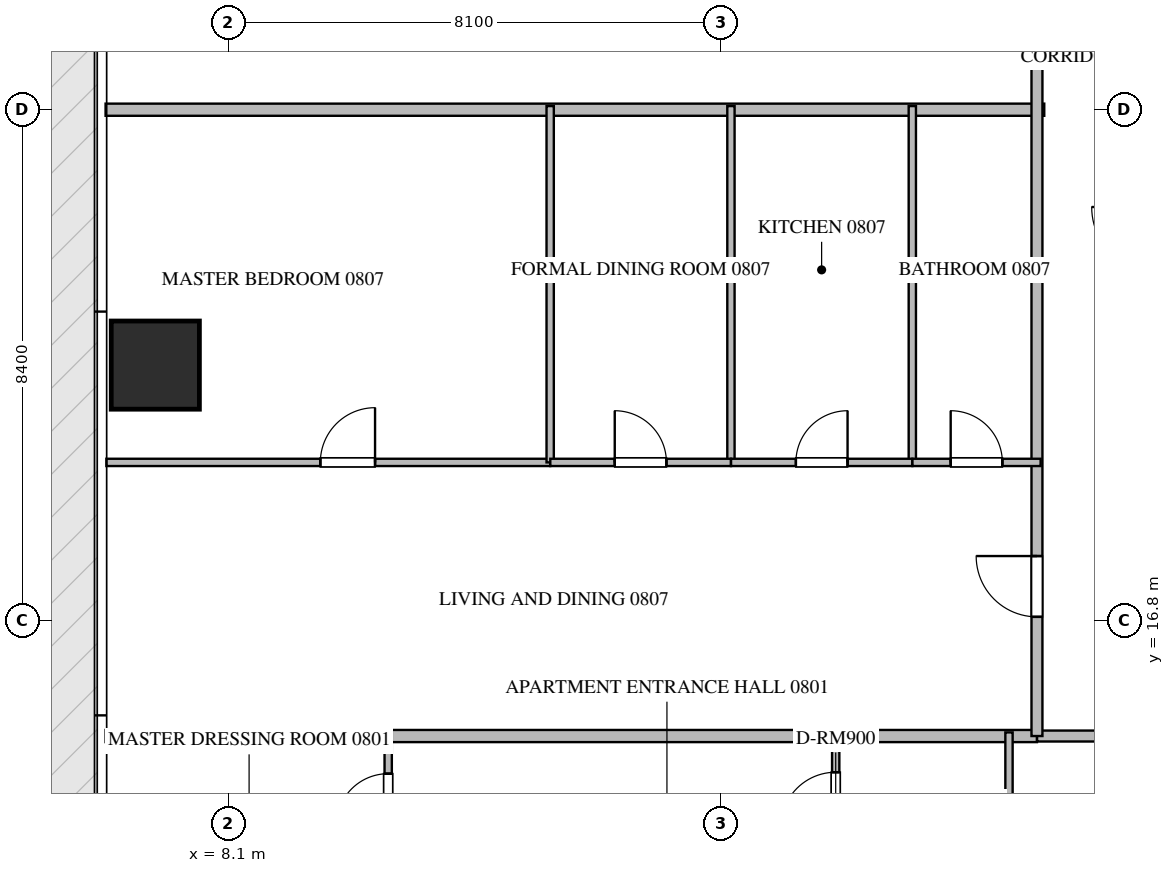
"""IFC4 building model, lengths in metres.
Left out: names, types, materials, properties, quantities, classifications, styles, units other than length and angle.
Written with IfcOpenShell. Run it as: python <this file> out.ifc"""

import sys

from ifc_helpers import new_model, si_unit, direction, frame, frame_2d, origin, origin_2d, place, context, subcontext, project, spatial, rectangle, extrude, source, transform, mapped, element, fill, save


model = new_model("IFC4")
c1 = context("Model", 3, precision=1e-05, world=origin(), true_north=direction((0.0, 1.0)))
c2 = subcontext(c1, "Body", "Model", "MODEL_VIEW")
j1 = project(units=[si_unit("LENGTHUNIT", "METRE"), si_unit("PLANEANGLEUNIT", "RADIAN")], contexts=[c1])
p1 = place(None, origin())
s1 = spatial("IfcSite", under=j1, at=p1, CompositionType="ELEMENT")
p2 = place(p1, origin())
s2 = spatial("IfcBuilding", under=s1, at=p2, CompositionType="ELEMENT")
p3 = place(p2, frame((0.0, 0.0, 37.95)))
s3 = spatial("IfcBuildingStorey", under=s2, at=p3, CompositionType="ELEMENT", Elevation=37.95)
m1 = source(origin(), c2, "Body", "SweptSolid", [
    extrude(rectangle(XDim=1.45, YDim=1.45, at=origin_2d()), origin(), (0.0, 0.0, 1.0), 3.75),
])
p4 = place(p3, frame((6.9, 21.0, -0.26), z_axis=(0.0, 0.0, 1.0), x_axis=(1.0, 0.0, 0.0)))
e1 = element("IfcColumn", 1, at=p4, inside=s3, PredefinedType="COLUMN", context=c2, shape_type="MappedRepresentation", body=[
    mapped(m1, transform((0.0, 0.0, 0.0), scale=1.0)),
])
p5 = place(p3, frame((6.082, 25.2, 0.0), z_axis=(0.0, 0.0, 1.0), x_axis=(1.0, 0.0, 0.0)))
e2 = element("IfcWall", 2, at=p5, inside=s3, PredefinedType="PARTITIONING", context=c2, shape_type="SweptSolid", body=[
    extrude(rectangle(XDim=15.438, YDim=0.2, at=frame_2d((7.719, 0.0))), origin(), (0.0, 0.0, 1.0), 3.49),
])
p6 = place(p3, frame((6.082, 14.9, 0.0), z_axis=(0.0, 0.0, 1.0), x_axis=(1.0, 0.0, 0.0)))
e3 = element("IfcWall", 3, at=p6, inside=s3, PredefinedType="PARTITIONING", context=c2, shape_type="SweptSolid", body=[
    extrude(rectangle(XDim=15.318, YDim=0.2, at=frame_2d((7.659, 0.0))), origin(), (0.0, 0.0, 1.0), 3.49),
])
p7 = place(p3, frame((21.402, 14.9, 0.0), z_axis=(0.0, 0.0, 1.0), x_axis=(1.0, 0.0, 0.0)))
e4 = element("IfcWall", 4, at=p7, inside=s3, PredefinedType="PARTITIONING", context=c2, shape_type="SweptSolid", body=[
    extrude(rectangle(XDim=21.996, YDim=0.18, at=frame_2d((10.998, 0.0))), origin(), (0.0, 0.0, 1.0), 3.49),
])
p8 = place(p7, frame((2.1, 0.0, 0.0)))
e5 = element("IfcOpeningElement", 5, at=p8, cuts=e4, PredefinedType="OPENING", context=c2, shape_type="SweptSolid", body=[
    extrude(rectangle(XDim=1.0, YDim=2.15, at=frame_2d((0.5, 1.075))), frame((0.0, 0.1, 0.0), z_axis=(0.0, -1.0, 0.0), x_axis=(1.0, 0.0, 0.0)), (0.0, 0.0, 1.0), 0.2),
])
p9 = place(p7, frame((14.109, 0.0, 0.0)))
e6 = element("IfcOpeningElement", 6, at=p9, cuts=e4, PredefinedType="OPENING", context=c2, shape_type="SweptSolid", body=[
    extrude(rectangle(XDim=1.0, YDim=2.15, at=frame_2d((0.5, 1.075))), frame((0.0, 0.1, 0.0), z_axis=(0.0, -1.0, 0.0), x_axis=(1.0, 0.0, 0.0)), (0.0, 0.0, 1.0), 0.2),
])
p10 = place(p7, frame((18.896, 0.0, 0.0)))
e7 = element("IfcOpeningElement", 7, at=p10, cuts=e4, PredefinedType="OPENING", context=c2, shape_type="SweptSolid", body=[
    extrude(rectangle(XDim=1.0, YDim=2.15, at=frame_2d((0.5, 1.075))), frame((0.0, 0.1, 0.0), z_axis=(0.0, -1.0, 0.0), x_axis=(1.0, 0.0, 0.0)), (0.0, 0.0, 1.0), 0.2),
])
p11 = place(p3, frame((21.4, 14.9, 0.0), z_axis=(0.0, 0.0, 1.0), x_axis=(0.0, 1.0, 0.0)))
e8 = element("IfcWall", 8, at=p11, inside=s3, PredefinedType="PARTITIONING", context=c2, shape_type="SweptSolid", body=[
    extrude(rectangle(XDim=20.6, YDim=0.18, at=frame_2d((10.3, 0.0))), origin(), (0.0, 0.0, 1.0), 3.49),
])
p12 = place(p11, frame((1.96, 0.0, 0.0)))
e9 = element("IfcOpeningElement", 9, at=p12, cuts=e8, PredefinedType="OPENING", context=c2, shape_type="SweptSolid", body=[
    extrude(rectangle(XDim=1.0, YDim=2.15, at=frame_2d((0.5, 1.075))), frame((0.0, 0.1, 0.0), z_axis=(0.0, -1.0, 0.0), x_axis=(1.0, 0.0, 0.0)), (0.0, 0.0, 1.0), 0.2),
])
p13 = place(p11, frame((13.583, 0.0, 0.0)))
e10 = element("IfcOpeningElement", 10, at=p13, cuts=e8, PredefinedType="OPENING", context=c2, shape_type="SweptSolid", body=[
    extrude(rectangle(XDim=1.0, YDim=2.15, at=frame_2d((0.5, 1.075))), frame((0.0, 0.1, 0.0), z_axis=(0.0, -1.0, 0.0), x_axis=(1.0, 0.0, 0.0)), (0.0, 0.0, 1.0), 0.2),
])
p14 = place(p3, frame((20.94, 12.15, 0.0), z_axis=(0.0, 0.0, 1.0), x_axis=(0.0, 1.0, 0.0)))
e11 = element("IfcWall", 11, at=p14, inside=s3, PredefinedType="PARTITIONING", context=c2, shape_type="SweptSolid", body=[
    extrude(rectangle(XDim=2.81, YDim=0.12, at=frame_2d((1.405, 0.0))), origin(), (0.0, 0.0, 1.0), 3.49),
])
p15 = place(p3, frame((18.09, 12.75, 0.0), z_axis=(0.0, 0.0, 1.0), x_axis=(0.0, 1.0, 0.0)))
e12 = element("IfcWall", 12, at=p15, inside=s3, PredefinedType="PARTITIONING", context=c2, shape_type="SweptSolid", body=[
    extrude(rectangle(XDim=2.21, YDim=0.12, at=frame_2d((1.105, 0.0))), origin(), (0.0, 0.0, 1.0), 3.49),
])
p16 = place(p15, frame((0.655, 0.0, 0.0)))
e13 = element("IfcOpeningElement", 13, at=p16, cuts=e12, PredefinedType="OPENING", context=c2, shape_type="SweptSolid", body=[
    extrude(rectangle(XDim=0.9, YDim=2.1, at=frame_2d((0.45, 1.05))), frame((0.0, 0.07, 0.0), z_axis=(0.0, -1.0, 0.0), x_axis=(1.0, 0.0, 0.0)), (0.0, 0.0, 1.0), 0.14),
])
p17 = place(p3, frame((10.73, 12.752, 0.0), z_axis=(0.0, 0.0, 1.0), x_axis=(0.0, 1.0, 0.0)))
e14 = element("IfcWall", 14, at=p17, inside=s3, PredefinedType="PARTITIONING", context=c2, shape_type="SweptSolid", body=[
    extrude(rectangle(XDim=2.208, YDim=0.12, at=frame_2d((1.104, 0.0))), origin(), (0.0, 0.0, 1.0), 3.49),
])
p18 = place(p17, frame((0.679, 0.0, 0.0)))
e15 = element("IfcOpeningElement", 15, at=p18, cuts=e14, PredefinedType="OPENING", context=c2, shape_type="SweptSolid", body=[
    extrude(rectangle(XDim=0.85, YDim=2.1, at=frame_2d((0.425, 1.05))), frame((0.0, 0.07, 0.0), z_axis=(0.0, -1.0, 0.0), x_axis=(1.0, 0.0, 0.0)), (0.0, 0.0, 1.0), 0.14),
])
p19 = place(p3, frame((6.095, 19.4, 0.0), z_axis=(0.0, 0.0, 1.0), x_axis=(1.0, 0.0, 0.0)))
e16 = element("IfcWall", 16, at=p19, inside=s3, PredefinedType="PARTITIONING", context=c2, shape_type="SweptSolid", body=[
    extrude(rectangle(XDim=7.299, YDim=0.12, at=frame_2d((3.649, 0.0))), origin(), (0.0, 0.0, 1.0), 3.49),
])
p20 = place(p19, frame((3.519, 0.0, 0.0)))
e17 = element("IfcOpeningElement", 17, at=p20, cuts=e16, PredefinedType="OPENING", context=c2, shape_type="SweptSolid", body=[
    extrude(rectangle(XDim=0.9, YDim=2.1, at=frame_2d((0.45, 1.05))), frame((0.0, 0.07, 0.0), z_axis=(0.0, -1.0, 0.0), x_axis=(1.0, 0.0, 0.0)), (0.0, 0.0, 1.0), 0.14),
])
for number, where, z_axis, x_axis in (
    (18, (13.394, 19.4, 0.0), (0.0, 0.0, 1.0), (0.0, 1.0, 0.0)),
    (19, (16.367, 19.4, 0.0), (0.0, 0.0, 1.0), (0.0, 1.0, 0.0)),
    (20, (19.35, 19.4, 0.0), (0.0, 0.0, 1.0), (0.0, 1.0, 0.0)),
):
    element("IfcWall", number, at=place(p3, frame(where, z_axis=z_axis, x_axis=x_axis)), inside=s3, PredefinedType="PARTITIONING", context=c2, shape_type="SweptSolid", body=[
        extrude(rectangle(XDim=5.86, YDim=0.12, at=frame_2d((2.93, 0.0))), origin(), (0.0, 0.0, 1.0), 3.49),
    ])
p21 = place(p3, frame((13.396, 19.4, 0.0), z_axis=(0.0, 0.0, 1.0), x_axis=(1.0, 0.0, 0.0)))
e21 = element("IfcWall", 21, at=p21, inside=s3, PredefinedType="PARTITIONING", context=c2, shape_type="SweptSolid", body=[
    extrude(rectangle(XDim=2.971, YDim=0.12, at=frame_2d((1.485, 0.0))), origin(), (0.0, 0.0, 1.0), 3.49),
])
p22 = place(p21, frame((1.06, 0.0, 0.0)))
e22 = element("IfcOpeningElement", 22, at=p22, cuts=e21, PredefinedType="OPENING", context=c2, shape_type="SweptSolid", body=[
    extrude(rectangle(XDim=0.85, YDim=2.1, at=frame_2d((0.425, 1.05))), frame((0.0, 0.07, 0.0), z_axis=(0.0, -1.0, 0.0), x_axis=(1.0, 0.0, 0.0)), (0.0, 0.0, 1.0), 0.14),
])
p23 = place(p3, frame((16.369, 19.4, 0.0), z_axis=(0.0, 0.0, 1.0), x_axis=(1.0, 0.0, 0.0)))
e23 = element("IfcWall", 23, at=p23, inside=s3, PredefinedType="PARTITIONING", context=c2, shape_type="SweptSolid", body=[
    extrude(rectangle(XDim=2.981, YDim=0.12, at=frame_2d((1.491, 0.0))), origin(), (0.0, 0.0, 1.0), 3.49),
])
p24 = place(p23, frame((1.066, 0.0, 0.0)))
e24 = element("IfcOpeningElement", 24, at=p24, cuts=e23, PredefinedType="OPENING", context=c2, shape_type="SweptSolid", body=[
    extrude(rectangle(XDim=0.85, YDim=2.1, at=frame_2d((0.425, 1.05))), frame((0.0, 0.07, 0.0), z_axis=(0.0, -1.0, 0.0), x_axis=(1.0, 0.0, 0.0)), (0.0, 0.0, 1.0), 0.14),
])
p25 = place(p3, frame((19.352, 19.4, 0.0), z_axis=(0.0, 0.0, 1.0), x_axis=(1.0, 0.0, 0.0)))
e25 = element("IfcWall", 25, at=p25, inside=s3, PredefinedType="PARTITIONING", context=c2, shape_type="SweptSolid", body=[
    extrude(rectangle(XDim=2.108, YDim=0.12, at=frame_2d((1.054, 0.0))), origin(), (0.0, 0.0, 1.0), 3.49),
])
p26 = place(p25, frame((0.629, 0.0, 0.0)))
e26 = element("IfcOpeningElement", 26, at=p26, cuts=e25, PredefinedType="OPENING", context=c2, shape_type="SweptSolid", body=[
    extrude(rectangle(XDim=0.85, YDim=2.1, at=frame_2d((0.425, 1.05))), frame((0.0, 0.07, 0.0), z_axis=(0.0, -1.0, 0.0), x_axis=(1.0, 0.0, 0.0)), (0.0, 0.0, 1.0), 0.14),
])
m2 = source(origin(), c2, "Body", "SweptSolid", [
    extrude(rectangle(XDim=1.0, YDim=2.15, at=frame_2d((0.5, 1.075))), frame((0.0, 0.025, 0.0), z_axis=(0.0, -1.0, 0.0), x_axis=(1.0, 0.0, 0.0)), (0.0, 0.0, 1.0), 0.05),
])
p27 = place(p12, origin())
e27 = element("IfcDoor", 27, at=p27, inside=s3, OperationType="SINGLE_SWING_RIGHT", PredefinedType="DOOR", context=c2, shape_type="MappedRepresentation", body=[
    mapped(m2, transform((0.0, 0.0, 0.0), scale=1.0)),
])
fill(e9, e27)
m3 = source(origin(), c2, "Body", "SweptSolid", [
    extrude(rectangle(XDim=0.9, YDim=2.1, at=frame_2d((0.45, 1.05))), frame((0.0, 0.025, 0.0), z_axis=(0.0, -1.0, 0.0), x_axis=(1.0, 0.0, 0.0)), (0.0, 0.0, 1.0), 0.05),
])
p28 = place(p16, origin())
e28 = element("IfcDoor", 28, at=p28, inside=s3, OperationType="SINGLE_SWING_LEFT", PredefinedType="DOOR", context=c2, shape_type="MappedRepresentation", body=[
    mapped(m3, transform((0.0, 0.0, 0.0), scale=1.0)),
])
fill(e13, e28)
m4 = source(origin(), c2, "Body", "SweptSolid", [
    extrude(rectangle(XDim=0.85, YDim=2.1, at=frame_2d((0.425, 1.05))), frame((0.0, 0.025, 0.0), z_axis=(0.0, -1.0, 0.0), x_axis=(1.0, 0.0, 0.0)), (0.0, 0.0, 1.0), 0.05),
])
p29 = place(p18, origin())
e29 = element("IfcDoor", 29, at=p29, inside=s3, OperationType="SINGLE_SWING_LEFT", PredefinedType="DOOR", context=c2, shape_type="MappedRepresentation", body=[
    mapped(m4, transform((0.0, 0.0, 0.0), scale=1.0)),
])
fill(e15, e29)
p30 = place(p20, origin())
e30 = element("IfcDoor", 30, at=p30, inside=s3, OperationType="SINGLE_SWING_RIGHT", PredefinedType="DOOR", context=c2, shape_type="MappedRepresentation", body=[
    mapped(m3, transform((0.0, 0.0, 0.0), scale=1.0)),
])
fill(e17, e30)
p31 = place(p22, origin())
e31 = element("IfcDoor", 31, at=p31, inside=s3, OperationType="SINGLE_SWING_LEFT", PredefinedType="DOOR", context=c2, shape_type="MappedRepresentation", body=[
    mapped(m4, transform((0.0, 0.0, 0.0), scale=1.0)),
])
fill(e22, e31)
p32 = place(p24, origin())
e32 = element("IfcDoor", 32, at=p32, inside=s3, OperationType="SINGLE_SWING_RIGHT", PredefinedType="DOOR", context=c2, shape_type="MappedRepresentation", body=[
    mapped(m4, transform((0.0, 0.0, 0.0), scale=1.0)),
])
fill(e24, e32)
p33 = place(p26, origin())
e33 = element("IfcDoor", 33, at=p33, inside=s3, OperationType="SINGLE_SWING_LEFT", PredefinedType="DOOR", context=c2, shape_type="MappedRepresentation", body=[
    mapped(m4, transform((0.0, 0.0, 0.0), scale=1.0)),
])
fill(e26, e33)
save(model, sys.argv[1])
